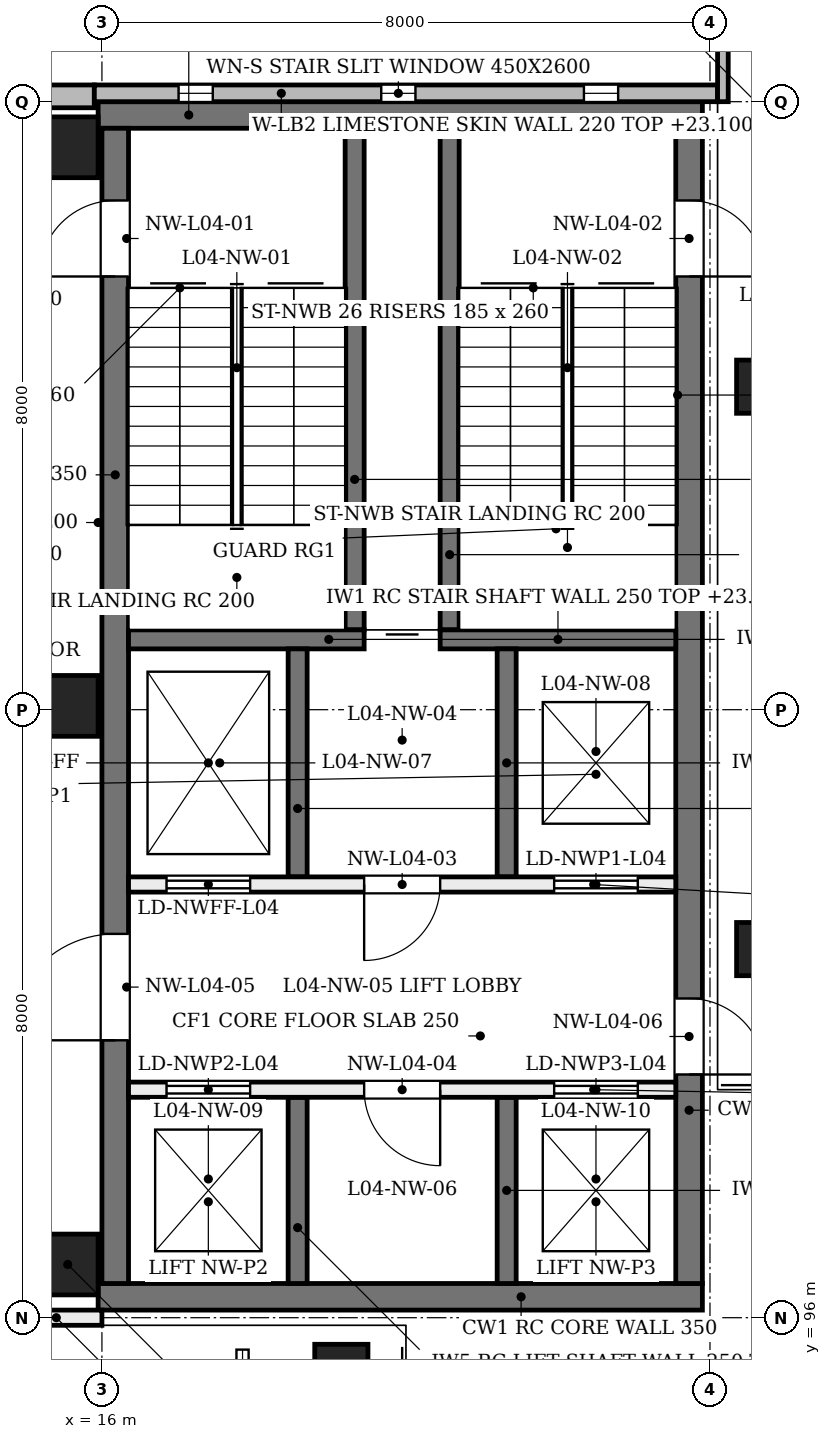
"""IFC4 building model, lengths in metres.
Left out: names, types, materials, properties, quantities, classifications, styles, units other than length and angle.
Written with IfcOpenShell. Run it as: python <this file> out.ifc"""

import sys

from ifc_helpers import new_model, si_unit, direction, frame, frame_2d, origin, origin_2d, place, context, subcontext, project, spatial, rectangle, extrude, element, fill, save


model = new_model("IFC4")
c1 = context("Model", 3, precision=1e-05, world=origin(), true_north=direction((0.0, 1.0)))
c2 = subcontext(c1, "Body", "Model", "MODEL_VIEW")
j1 = project(units=[si_unit("LENGTHUNIT", "METRE"), si_unit("PLANEANGLEUNIT", "RADIAN")], contexts=[c1])
p1 = place(None, origin())
s1 = spatial("IfcSite", under=j1, at=p1, CompositionType="ELEMENT")
p2 = place(p1, origin())
s2 = spatial("IfcBuilding", under=s1, at=p2, CompositionType="ELEMENT")
p3 = place(p2, frame((0.0, 0.0, 19.2)))
s3 = spatial("IfcBuildingStorey", under=s2, at=p3, CompositionType="ELEMENT", Elevation=19.2)
for number, where, z_axis, x_axis in (
    (1, (15.95, 96.275, 0.0), (0.0, 0.0, 1.0), (1.0, 0.0, 0.0)),
    (2, (15.95, 111.825, 0.0), (0.0, 0.0, 1.0), (1.0, 0.0, 0.0)),
):
    element("IfcWall", number, at=place(p3, frame(where, z_axis=z_axis, x_axis=x_axis)), inside=s3, PredefinedType="SHEAR", context=c2, shape_type="SweptSolid", body=[
        extrude(rectangle(XDim=7.95, YDim=0.35, at=frame_2d((3.975, 0.0))), origin(), (0.0, 0.0, 1.0), 4.58),
    ])
p4 = place(p3, frame((16.175, 96.45, 0.0), z_axis=(0.0, 0.0, 1.0), x_axis=(0.0, 1.0, 0.0)))
e3 = element("IfcWall", 3, at=p4, inside=s3, PredefinedType="SHEAR", context=c2, shape_type="SweptSolid", body=[
    extrude(rectangle(XDim=15.2, YDim=0.35, at=frame_2d((7.6, 0.0))), origin(), (0.0, 0.0, 1.0), 4.58),
])
p5 = place(p4, frame((13.25, 0.0, 0.0)))
e4 = element("IfcOpeningElement", 4, at=p5, cuts=e3, PredefinedType="OPENING", context=c2, shape_type="SweptSolid", body=[
    extrude(rectangle(XDim=1.0, YDim=2.1, at=frame_2d((0.5, 1.05))), frame((0.0, 0.185, 0.0), z_axis=(0.0, -1.0, 0.0), x_axis=(1.0, 0.0, 0.0)), (0.0, 0.0, 1.0), 0.37),
])
p6 = place(p4, frame((3.2, 0.0, 0.0)))
e5 = element("IfcOpeningElement", 5, at=p6, cuts=e3, PredefinedType="OPENING", context=c2, shape_type="SweptSolid", body=[
    extrude(rectangle(XDim=1.4, YDim=2.1, at=frame_2d((0.7, 1.05))), frame((0.0, 0.185, 0.0), z_axis=(0.0, -1.0, 0.0), x_axis=(1.0, 0.0, 0.0)), (0.0, 0.0, 1.0), 0.37),
])
p7 = place(p3, frame((23.725, 96.45, 0.0), z_axis=(0.0, 0.0, 1.0), x_axis=(0.0, 1.0, 0.0)))
e6 = element("IfcWall", 6, at=p7, inside=s3, PredefinedType="SHEAR", context=c2, shape_type="SweptSolid", body=[
    extrude(rectangle(XDim=15.2, YDim=0.35, at=frame_2d((7.6, 0.0))), origin(), (0.0, 0.0, 1.0), 4.58),
])
p8 = place(p7, frame((13.25, 0.0, 0.0)))
e7 = element("IfcOpeningElement", 7, at=p8, cuts=e6, PredefinedType="OPENING", context=c2, shape_type="SweptSolid", body=[
    extrude(rectangle(XDim=1.0, YDim=2.1, at=frame_2d((0.5, 1.05))), frame((0.0, 0.185, 0.0), z_axis=(0.0, -1.0, 0.0), x_axis=(1.0, 0.0, 0.0)), (0.0, 0.0, 1.0), 0.37),
])
p9 = place(p7, frame((2.75, 0.0, 0.0)))
e8 = element("IfcOpeningElement", 8, at=p9, cuts=e6, PredefinedType="OPENING", context=c2, shape_type="SweptSolid", body=[
    extrude(rectangle(XDim=1.0, YDim=2.1, at=frame_2d((0.5, 1.05))), frame((0.0, 0.185, 0.0), z_axis=(0.0, -1.0, 0.0), x_axis=(1.0, 0.0, 0.0)), (0.0, 0.0, 1.0), 0.37),
])
for number, where, z_axis, x_axis in (
    (9, (15.55, 96.7, 0.0), (0.0, 0.0, 1.0), (1.0, 0.0, 0.0)),
    (10, (15.55, 104.05, 0.0), (0.0, 0.0, 1.0), (1.0, 0.0, 0.0)),
    (11, (15.55, 111.4, 0.0), (0.0, 0.0, 1.0), (1.0, 0.0, 0.0)),
):
    element("IfcColumn", number, at=place(p3, frame(where, z_axis=z_axis, x_axis=x_axis)), inside=s3, PredefinedType="COLUMN", context=c2, shape_type="SweptSolid", body=[
        extrude(rectangle(XDim=0.8, YDim=0.8, at=origin_2d()), origin(), (0.0, 0.0, 1.0), 4.8),
    ])
for number, where, z_axis, x_axis in (
    (12, (24.7, 100.6, 0.0), (0.0, 0.204, 0.979), (-1.0, 0.0, 0.0)),
    (13, (24.7, 108.0, 0.0), (0.0, 0.204, 0.979), (-1.0, 0.0, 0.0)),
):
    element("IfcColumn", number, at=place(p3, frame(where, z_axis=z_axis, x_axis=x_axis)), inside=s3, PredefinedType="COLUMN", context=c2, shape_type="SweptSolid", body=[
        extrude(rectangle(XDim=0.7, YDim=0.7, at=origin_2d()), origin(), (0.0, 0.0, 1.0), 4.678),
    ])
p10 = place(p3, frame((19.4, 95.3, 0.0), z_axis=(-0.203952265704, 0.0, 0.978980833987), x_axis=(0.0, -1.0, 0.0)))
e14 = element("IfcColumn", 14, at=p10, inside=s3, PredefinedType="COLUMN", context=c2, shape_type="SweptSolid", body=[
    extrude(rectangle(XDim=0.7, YDim=0.7, at=origin_2d()), origin(), (0.0, 0.0, 1.0), 4.903),
])
p11 = place(p3, frame((8.0, 112.07, 0.0), z_axis=(0.0, 0.0, 1.0), x_axis=(1.0, 0.0, 0.0)))
e15 = element("IfcWall", 15, at=p11, inside=s3, PredefinedType="SOLIDWALL", context=c2, shape_type="SweptSolid", body=[
    extrude(rectangle(XDim=7.9, YDim=0.3, at=frame_2d((3.95, 0.0))), origin(), (0.0, 0.0, 1.0), 3.9),
])
p12 = place(p11, frame((0.717, 0.0, 0.75)))
e16 = element("IfcOpeningElement", 16, at=p12, cuts=e15, PredefinedType="OPENING", context=c2, shape_type="SweptSolid", body=[
    extrude(rectangle(XDim=1.2, YDim=3.1, at=frame_2d((0.6, 1.55))), frame((0.0, 0.16, 0.0), z_axis=(0.0, -1.0, 0.0), x_axis=(1.0, 0.0, 0.0)), (0.0, 0.0, 1.0), 0.32),
])
p13 = place(p11, frame((3.35, 0.0, 0.75)))
e17 = element("IfcOpeningElement", 17, at=p13, cuts=e15, PredefinedType="OPENING", context=c2, shape_type="SweptSolid", body=[
    extrude(rectangle(XDim=1.2, YDim=3.1, at=frame_2d((0.6, 1.55))), frame((0.0, 0.16, 0.0), z_axis=(0.0, -1.0, 0.0), x_axis=(1.0, 0.0, 0.0)), (0.0, 0.0, 1.0), 0.32),
])
p14 = place(p11, frame((5.983, 0.0, 0.75)))
e18 = element("IfcOpeningElement", 18, at=p14, cuts=e15, PredefinedType="OPENING", context=c2, shape_type="SweptSolid", body=[
    extrude(rectangle(XDim=1.2, YDim=3.1, at=frame_2d((0.6, 1.55))), frame((0.0, 0.16, 0.0), z_axis=(0.0, -1.0, 0.0), x_axis=(1.0, 0.0, 0.0)), (0.0, 0.0, 1.0), 0.32),
])
p15 = place(p3, frame((15.9, 112.11, 0.0), z_axis=(0.0, 0.0, 1.0), x_axis=(1.0, 0.0, 0.0)))
e19 = element("IfcWall", 19, at=p15, inside=s3, PredefinedType="SOLIDWALL", context=c2, shape_type="SweptSolid", body=[
    extrude(rectangle(XDim=8.2, YDim=0.22, at=frame_2d((4.1, 0.0))), origin(), (0.0, 0.0, 1.0), 3.9),
])
p16 = place(p15, frame((1.108, 0.0, 0.9)))
e20 = element("IfcOpeningElement", 20, at=p16, cuts=e19, PredefinedType="OPENING", context=c2, shape_type="SweptSolid", body=[
    extrude(rectangle(XDim=0.45, YDim=2.6, at=frame_2d((0.225, 1.3))), frame((0.0, 0.12, 0.0), z_axis=(0.0, -1.0, 0.0), x_axis=(1.0, 0.0, 0.0)), (0.0, 0.0, 1.0), 0.24),
])
p17 = place(p15, frame((3.775, 0.0, 0.9)))
e21 = element("IfcOpeningElement", 21, at=p17, cuts=e19, PredefinedType="OPENING", context=c2, shape_type="SweptSolid", body=[
    extrude(rectangle(XDim=0.45, YDim=2.6, at=frame_2d((0.225, 1.3))), frame((0.0, 0.12, 0.0), z_axis=(0.0, -1.0, 0.0), x_axis=(1.0, 0.0, 0.0)), (0.0, 0.0, 1.0), 0.24),
])
p18 = place(p15, frame((6.442, 0.0, 0.9)))
e22 = element("IfcOpeningElement", 22, at=p18, cuts=e19, PredefinedType="OPENING", context=c2, shape_type="SweptSolid", body=[
    extrude(rectangle(XDim=0.45, YDim=2.6, at=frame_2d((0.225, 1.3))), frame((0.0, 0.12, 0.0), z_axis=(0.0, -1.0, 0.0), x_axis=(1.0, 0.0, 0.0)), (0.0, 0.0, 1.0), 0.24),
])
p19 = place(p3, frame((24.17, 112.0, 0.0), z_axis=(0.0, 0.0, 1.0), x_axis=(0.0, 1.0, 0.0)))
e23 = element("IfcWall", 23, at=p19, inside=s3, PredefinedType="SOLIDWALL", context=c2, shape_type="SweptSolid", body=[
    extrude(rectangle(XDim=4.0, YDim=0.14, at=frame_2d((2.0, 0.0))), origin(), (0.0, 0.0, 1.0), 3.9),
])
for number, where, z_axis, x_axis in (
    (24, (19.325, 111.65, 0.0), (0.0, 0.0, 1.0), (0.0, -1.0, 0.0)),
    (25, (20.575, 111.65, 0.0), (0.0, 0.0, 1.0), (0.0, -1.0, 0.0)),
):
    element("IfcWall", number, at=place(p3, frame(where, z_axis=z_axis, x_axis=x_axis)), inside=s3, PredefinedType="SOLIDWALL", context=c2, shape_type="SweptSolid", body=[
        extrude(rectangle(XDim=6.6, YDim=0.25, at=frame_2d((3.3, 0.0))), origin(), (0.0, 0.0, 1.0), 4.55),
    ])
p20 = place(p3, frame((16.35, 104.925, 0.0), z_axis=(0.0, 0.0, 1.0), x_axis=(1.0, 0.0, 0.0)))
e26 = element("IfcWall", 26, at=p20, inside=s3, PredefinedType="SOLIDWALL", context=c2, shape_type="SweptSolid", body=[
    extrude(rectangle(XDim=3.1, YDim=0.25, at=frame_2d((1.55, 0.0))), origin(), (0.0, 0.0, 1.0), 4.55),
])
p21 = place(p3, frame((20.45, 104.925, 0.0), z_axis=(0.0, 0.0, 1.0), x_axis=(1.0, 0.0, 0.0)))
e27 = element("IfcWall", 27, at=p21, inside=s3, PredefinedType="SOLIDWALL", context=c2, shape_type="SweptSolid", body=[
    extrude(rectangle(XDim=3.1, YDim=0.25, at=frame_2d((1.55, 0.0))), origin(), (0.0, 0.0, 1.0), 4.55),
])
p22 = place(p3, frame((18.575, 104.8, 0.0), z_axis=(0.0, 0.0, 1.0), x_axis=(0.0, -1.0, 0.0)))
e28 = element("IfcWall", 28, at=p22, inside=s3, PredefinedType="SOLIDWALL", context=c2, shape_type="SweptSolid", body=[
    extrude(rectangle(XDim=3.0, YDim=0.25, at=frame_2d((1.5, 0.0))), origin(), (0.0, 0.0, 1.0), 4.55),
])
p23 = place(p3, frame((18.575, 98.9, 0.0), z_axis=(0.0, 0.0, 1.0), x_axis=(0.0, -1.0, 0.0)))
e29 = element("IfcWall", 29, at=p23, inside=s3, PredefinedType="SOLIDWALL", context=c2, shape_type="SweptSolid", body=[
    extrude(rectangle(XDim=2.45, YDim=0.25, at=frame_2d((1.225, 0.0))), origin(), (0.0, 0.0, 1.0), 4.55),
])
p24 = place(p3, frame((21.325, 104.8, 0.0), z_axis=(0.0, 0.0, 1.0), x_axis=(0.0, -1.0, 0.0)))
e30 = element("IfcWall", 30, at=p24, inside=s3, PredefinedType="SOLIDWALL", context=c2, shape_type="SweptSolid", body=[
    extrude(rectangle(XDim=3.0, YDim=0.25, at=frame_2d((1.5, 0.0))), origin(), (0.0, 0.0, 1.0), 4.55),
])
p25 = place(p3, frame((21.325, 98.9, 0.0), z_axis=(0.0, 0.0, 1.0), x_axis=(0.0, -1.0, 0.0)))
e31 = element("IfcWall", 31, at=p25, inside=s3, PredefinedType="SOLIDWALL", context=c2, shape_type="SweptSolid", body=[
    extrude(rectangle(XDim=2.45, YDim=0.25, at=frame_2d((1.225, 0.0))), origin(), (0.0, 0.0, 1.0), 4.55),
])
p26 = place(p3, frame((16.35, 101.7, 0.0), z_axis=(0.0, 0.0, 1.0), x_axis=(1.0, 0.0, 0.0)))
e32 = element("IfcWall", 32, at=p26, inside=s3, PredefinedType="SOLIDWALL", context=c2, shape_type="SweptSolid", body=[
    extrude(rectangle(XDim=7.2, YDim=0.2, at=frame_2d((3.6, 0.0))), origin(), (0.0, 0.0, 1.0), 4.55),
])
p27 = place(p26, frame((0.5, 0.0, 0.0)))
e33 = element("IfcOpeningElement", 33, at=p27, cuts=e32, PredefinedType="OPENING", context=c2, shape_type="SweptSolid", body=[
    extrude(rectangle(XDim=1.1, YDim=2.1, at=frame_2d((0.55, 1.05))), frame((0.0, 0.11, 0.0), z_axis=(0.0, -1.0, 0.0), x_axis=(1.0, 0.0, 0.0)), (0.0, 0.0, 1.0), 0.22),
])
p28 = place(p26, frame((5.6, 0.0, 0.0)))
e34 = element("IfcOpeningElement", 34, at=p28, cuts=e32, PredefinedType="OPENING", context=c2, shape_type="SweptSolid", body=[
    extrude(rectangle(XDim=1.1, YDim=2.1, at=frame_2d((0.55, 1.05))), frame((0.0, 0.11, 0.0), z_axis=(0.0, -1.0, 0.0), x_axis=(1.0, 0.0, 0.0)), (0.0, 0.0, 1.0), 0.22),
])
p29 = place(p26, frame((3.1, 0.0, 0.0)))
e35 = element("IfcOpeningElement", 35, at=p29, cuts=e32, PredefinedType="OPENING", context=c2, shape_type="SweptSolid", body=[
    extrude(rectangle(XDim=1.0, YDim=2.1, at=frame_2d((0.5, 1.05))), frame((0.0, 0.11, 0.0), z_axis=(0.0, -1.0, 0.0), x_axis=(1.0, 0.0, 0.0)), (0.0, 0.0, 1.0), 0.22),
])
p30 = place(p3, frame((16.35, 99.0, 0.0), z_axis=(0.0, 0.0, 1.0), x_axis=(1.0, 0.0, 0.0)))
e36 = element("IfcWall", 36, at=p30, inside=s3, PredefinedType="SOLIDWALL", context=c2, shape_type="SweptSolid", body=[
    extrude(rectangle(XDim=7.2, YDim=0.2, at=frame_2d((3.6, 0.0))), origin(), (0.0, 0.0, 1.0), 4.55),
])
p31 = place(p30, frame((0.5, 0.0, 0.0)))
e37 = element("IfcOpeningElement", 37, at=p31, cuts=e36, PredefinedType="OPENING", context=c2, shape_type="SweptSolid", body=[
    extrude(rectangle(XDim=1.1, YDim=2.1, at=frame_2d((0.55, 1.05))), frame((0.0, 0.11, 0.0), z_axis=(0.0, -1.0, 0.0), x_axis=(1.0, 0.0, 0.0)), (0.0, 0.0, 1.0), 0.22),
])
p32 = place(p30, frame((5.6, 0.0, 0.0)))
e38 = element("IfcOpeningElement", 38, at=p32, cuts=e36, PredefinedType="OPENING", context=c2, shape_type="SweptSolid", body=[
    extrude(rectangle(XDim=1.1, YDim=2.1, at=frame_2d((0.55, 1.05))), frame((0.0, 0.11, 0.0), z_axis=(0.0, -1.0, 0.0), x_axis=(1.0, 0.0, 0.0)), (0.0, 0.0, 1.0), 0.22),
])
p33 = place(p30, frame((3.1, 0.0, 0.0)))
e39 = element("IfcOpeningElement", 39, at=p33, cuts=e36, PredefinedType="OPENING", context=c2, shape_type="SweptSolid", body=[
    extrude(rectangle(XDim=1.0, YDim=2.1, at=frame_2d((0.5, 1.05))), frame((0.0, 0.11, 0.0), z_axis=(0.0, -1.0, 0.0), x_axis=(1.0, 0.0, 0.0)), (0.0, 0.0, 1.0), 0.22),
])
p34 = place(p3, frame((14.0, 96.0, 0.0), z_axis=(0.0, 0.0, 1.0), x_axis=(1.0, 0.0, 0.0)))
e40 = element("IfcWall", 40, at=p34, inside=s3, PredefinedType="PARTITIONING", context=c2, shape_type="SweptSolid", body=[
    extrude(rectangle(XDim=2.0, YDim=0.2, at=frame_2d((1.0, 0.0))), origin(), (0.0, 0.0, 1.0), 3.88),
])
p35 = place(p34, frame((0.05, 0.0, 0.0)))
e41 = element("IfcOpeningElement", 41, at=p35, cuts=e40, PredefinedType="OPENING", context=c2, shape_type="SweptSolid", body=[
    extrude(rectangle(XDim=1.0, YDim=2.1, at=frame_2d((0.5, 1.05))), frame((0.0, 0.11, 0.0), z_axis=(0.0, -1.0, 0.0), x_axis=(1.0, 0.0, 0.0)), (0.0, 0.0, 1.0), 0.22),
])
p36 = place(p16, origin())
e42 = element("IfcWindow", 42, at=p36, inside=s3, PartitioningType="SINGLE_PANEL", PredefinedType="WINDOW", context=c2, shape_type="SweptSolid", body=[
    extrude(rectangle(XDim=0.45, YDim=2.6, at=frame_2d((0.225, 1.3))), frame((0.0, 0.03, 0.0), z_axis=(0.0, -1.0, 0.0), x_axis=(1.0, 0.0, 0.0)), (0.0, 0.0, 1.0), 0.06),
])
fill(e20, e42)
p37 = place(p17, origin())
e43 = element("IfcWindow", 43, at=p37, inside=s3, PartitioningType="SINGLE_PANEL", PredefinedType="WINDOW", context=c2, shape_type="SweptSolid", body=[
    extrude(rectangle(XDim=0.45, YDim=2.6, at=frame_2d((0.225, 1.3))), frame((0.0, 0.03, 0.0), z_axis=(0.0, -1.0, 0.0), x_axis=(1.0, 0.0, 0.0)), (0.0, 0.0, 1.0), 0.06),
])
fill(e21, e43)
p38 = place(p18, origin())
e44 = element("IfcWindow", 44, at=p38, inside=s3, PartitioningType="SINGLE_PANEL", PredefinedType="WINDOW", context=c2, shape_type="SweptSolid", body=[
    extrude(rectangle(XDim=0.45, YDim=2.6, at=frame_2d((0.225, 1.3))), frame((0.0, 0.03, 0.0), z_axis=(0.0, -1.0, 0.0), x_axis=(1.0, 0.0, 0.0)), (0.0, 0.0, 1.0), 0.06),
])
fill(e22, e44)
p39 = place(p5, origin())
e45 = element("IfcDoor", 45, at=p39, inside=s3, OperationType="SINGLE_SWING_LEFT", PredefinedType="DOOR", context=c2, shape_type="SweptSolid", body=[
    extrude(rectangle(XDim=1.0, YDim=2.1, at=frame_2d((0.5, 1.05))), frame((0.0, 0.025, 0.0), z_axis=(0.0, -1.0, 0.0), x_axis=(1.0, 0.0, 0.0)), (0.0, 0.0, 1.0), 0.05),
])
fill(e4, e45)
p40 = place(p8, frame((1.0, 0.0, 0.0), z_axis=(0.0, 0.0, 1.0), x_axis=(-1.0, 0.0, 0.0)))
e46 = element("IfcDoor", 46, at=p40, inside=s3, OperationType="SINGLE_SWING_LEFT", PredefinedType="DOOR", context=c2, shape_type="SweptSolid", body=[
    extrude(rectangle(XDim=1.0, YDim=2.1, at=frame_2d((0.5, 1.05))), frame((0.0, 0.025, 0.0), z_axis=(0.0, -1.0, 0.0), x_axis=(1.0, 0.0, 0.0)), (0.0, 0.0, 1.0), 0.05),
])
fill(e7, e46)
p41 = place(p27, frame((1.1, 0.0, 0.0), z_axis=(0.0, 0.0, 1.0), x_axis=(-1.0, 0.0, 0.0)))
e47 = element("IfcDoor", 47, at=p41, inside=s3, OperationType="DOUBLE_DOOR_SLIDING", PredefinedType="DOOR", context=c2, shape_type="SweptSolid", body=[
    extrude(rectangle(XDim=1.1, YDim=2.1, at=frame_2d((0.55, 1.05))), frame((0.0, 0.025, 0.0), z_axis=(0.0, -1.0, 0.0), x_axis=(1.0, 0.0, 0.0)), (0.0, 0.0, 1.0), 0.05),
])
fill(e33, e47)
p42 = place(p28, frame((1.1, 0.0, 0.0), z_axis=(0.0, 0.0, 1.0), x_axis=(-1.0, 0.0, 0.0)))
e48 = element("IfcDoor", 48, at=p42, inside=s3, OperationType="DOUBLE_DOOR_SLIDING", PredefinedType="DOOR", context=c2, shape_type="SweptSolid", body=[
    extrude(rectangle(XDim=1.1, YDim=2.1, at=frame_2d((0.55, 1.05))), frame((0.0, 0.025, 0.0), z_axis=(0.0, -1.0, 0.0), x_axis=(1.0, 0.0, 0.0)), (0.0, 0.0, 1.0), 0.05),
])
fill(e34, e48)
p43 = place(p31, origin())
e49 = element("IfcDoor", 49, at=p43, inside=s3, OperationType="DOUBLE_DOOR_SLIDING", PredefinedType="DOOR", context=c2, shape_type="SweptSolid", body=[
    extrude(rectangle(XDim=1.1, YDim=2.1, at=frame_2d((0.55, 1.05))), frame((0.0, 0.025, 0.0), z_axis=(0.0, -1.0, 0.0), x_axis=(1.0, 0.0, 0.0)), (0.0, 0.0, 1.0), 0.05),
])
fill(e37, e49)
p44 = place(p32, origin())
e50 = element("IfcDoor", 50, at=p44, inside=s3, OperationType="DOUBLE_DOOR_SLIDING", PredefinedType="DOOR", context=c2, shape_type="SweptSolid", body=[
    extrude(rectangle(XDim=1.1, YDim=2.1, at=frame_2d((0.55, 1.05))), frame((0.0, 0.025, 0.0), z_axis=(0.0, -1.0, 0.0), x_axis=(1.0, 0.0, 0.0)), (0.0, 0.0, 1.0), 0.05),
])
fill(e38, e50)
p45 = place(p29, frame((1.0, 0.0, 0.0), z_axis=(0.0, 0.0, 1.0), x_axis=(-1.0, 0.0, 0.0)))
e51 = element("IfcDoor", 51, at=p45, inside=s3, OperationType="SINGLE_SWING_LEFT", PredefinedType="DOOR", context=c2, shape_type="SweptSolid", body=[
    extrude(rectangle(XDim=1.0, YDim=2.1, at=frame_2d((0.5, 1.05))), frame((0.0, 0.025, 0.0), z_axis=(0.0, -1.0, 0.0), x_axis=(1.0, 0.0, 0.0)), (0.0, 0.0, 1.0), 0.05),
])
fill(e35, e51)
p46 = place(p33, origin())
e52 = element("IfcDoor", 52, at=p46, inside=s3, OperationType="SINGLE_SWING_RIGHT", PredefinedType="DOOR", context=c2, shape_type="SweptSolid", body=[
    extrude(rectangle(XDim=1.0, YDim=2.1, at=frame_2d((0.5, 1.05))), frame((0.0, 0.025, 0.0), z_axis=(0.0, -1.0, 0.0), x_axis=(1.0, 0.0, 0.0)), (0.0, 0.0, 1.0), 0.05),
])
fill(e39, e52)
p47 = place(p6, origin())
e53 = element("IfcDoor", 53, at=p47, inside=s3, OperationType="SINGLE_SWING_LEFT", PredefinedType="DOOR", context=c2, shape_type="SweptSolid", body=[
    extrude(rectangle(XDim=1.4, YDim=2.1, at=frame_2d((0.7, 1.05))), frame((0.0, 0.025, 0.0), z_axis=(0.0, -1.0, 0.0), x_axis=(1.0, 0.0, 0.0)), (0.0, 0.0, 1.0), 0.05),
])
fill(e5, e53)
p48 = place(p9, frame((1.0, 0.0, 0.0), z_axis=(0.0, 0.0, 1.0), x_axis=(-1.0, 0.0, 0.0)))
e54 = element("IfcDoor", 54, at=p48, inside=s3, OperationType="SINGLE_SWING_LEFT", PredefinedType="DOOR", context=c2, shape_type="SweptSolid", body=[
    extrude(rectangle(XDim=1.0, YDim=2.1, at=frame_2d((0.5, 1.05))), frame((0.0, 0.025, 0.0), z_axis=(0.0, -1.0, 0.0), x_axis=(1.0, 0.0, 0.0)), (0.0, 0.0, 1.0), 0.05),
])
fill(e8, e54)
save(model, sys.argv[1])
